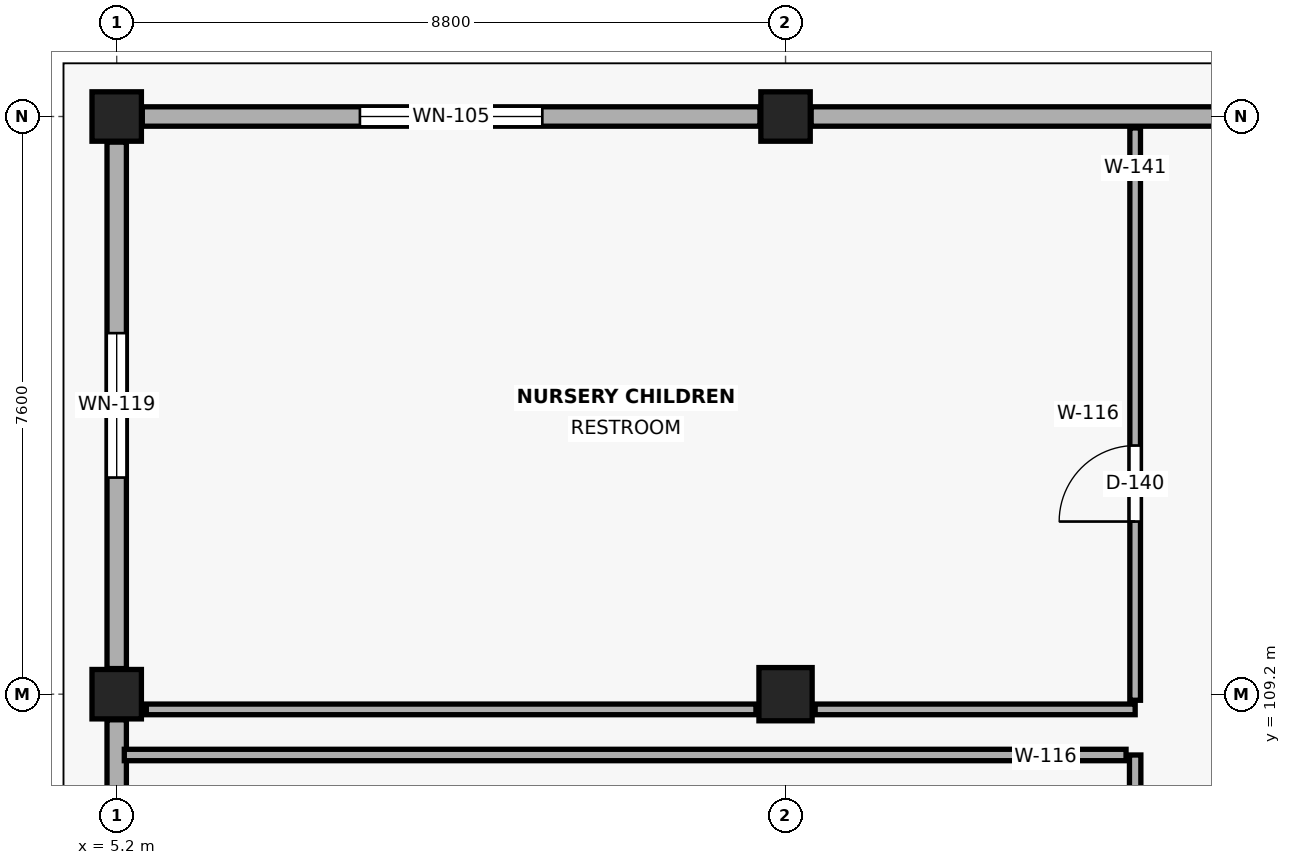
"""IFC4 building model, lengths in metres.
Left out: names, types, materials, properties, quantities, classifications, styles, units other than length and angle.
Written with IfcOpenShell. Run it as: python <this file> out.ifc"""

import sys

from ifc_helpers import new_model, si_unit, direction, frame, frame_2d, origin, origin_2d, place, context, subcontext, project, spatial, rectangle, extrude, element, fill, save


model = new_model("IFC4")
c1 = context("Model", 3, precision=1e-05, world=origin(), true_north=direction((0.0, 1.0)))
c2 = subcontext(c1, "Body", "Model", "MODEL_VIEW")
j1 = project(units=[si_unit("LENGTHUNIT", "METRE"), si_unit("PLANEANGLEUNIT", "RADIAN")], contexts=[c1])
p1 = place(None, origin())
s1 = spatial("IfcSite", under=j1, at=p1, CompositionType="ELEMENT")
p2 = place(p1, origin())
s2 = spatial("IfcBuilding", under=s1, at=p2, CompositionType="ELEMENT")
p3 = place(p2, origin())
s3 = spatial("IfcBuildingStorey", under=s2, at=p3, CompositionType="ELEMENT", Elevation=0.0)
for number, where, z_axis, x_axis in (
    (1, (5.2, 109.2, 0.0), (0.0, 0.0, 1.0), (1.0, 0.0, 0.0)),
    (2, (5.2, 116.8, 0.0), (0.0, 0.0, 1.0), (1.0, 0.0, 0.0)),
):
    element("IfcColumn", number, at=place(p3, frame(where, z_axis=z_axis, x_axis=x_axis)), inside=s3, PredefinedType="COLUMN", context=c2, shape_type="SweptSolid", body=[
        extrude(rectangle(XDim=0.65, YDim=0.65, at=origin_2d()), origin(), (0.0, 0.0, 1.0), 5.1),
    ])
p4 = place(p3, frame((14.0, 109.2, 0.0), z_axis=(0.0, 0.0, 1.0), x_axis=(1.0, 0.0, 0.0)))
e3 = element("IfcColumn", 3, at=p4, inside=s3, PredefinedType="COLUMN", context=c2, shape_type="SweptSolid", body=[
    extrude(rectangle(XDim=0.7, YDim=0.7, at=origin_2d()), origin(), (0.0, 0.0, 1.0), 5.1),
])
p5 = place(p3, frame((14.0, 116.8, 0.0), z_axis=(0.0, 0.0, 1.0), x_axis=(1.0, 0.0, 0.0)))
e4 = element("IfcColumn", 4, at=p5, inside=s3, PredefinedType="COLUMN", context=c2, shape_type="SweptSolid", body=[
    extrude(rectangle(XDim=0.65, YDim=0.65, at=origin_2d()), origin(), (0.0, 0.0, 1.0), 5.1),
])
p6 = place(p3, frame((5.537, 116.8, 0.0), z_axis=(0.0, 0.0, 1.0), x_axis=(1.0, 0.0, 0.0)))
e5 = element("IfcWall", 5, at=p6, inside=s3, PredefinedType="SOLIDWALL", context=c2, shape_type="SweptSolid", body=[
    extrude(rectangle(XDim=8.126, YDim=0.255, at=frame_2d((4.063, 0.0))), origin(), (0.0, 0.0, 1.0), 3.94),
])
p7 = place(p6, frame((2.863, 0.0, 0.85)))
e6 = element("IfcOpeningElement", 6, at=p7, cuts=e5, PredefinedType="OPENING", context=c2, shape_type="SweptSolid", body=[
    extrude(rectangle(XDim=2.4, YDim=2.4, at=frame_2d((1.2, 1.2))), frame((0.0, 0.139, 0.0), z_axis=(0.0, -1.0, 0.0), x_axis=(1.0, 0.0, 0.0)), (0.0, 0.0, 1.0), 0.279),
])
p8 = place(p3, frame((14.337, 116.8, 0.0), z_axis=(0.0, 0.0, 1.0), x_axis=(1.0, 0.0, 0.0)))
e7 = element("IfcWall", 7, at=p8, inside=s3, PredefinedType="SOLIDWALL", context=c2, shape_type="SweptSolid", body=[
    extrude(rectangle(XDim=8.526, YDim=0.255, at=frame_2d((4.263, 0.0))), origin(), (0.0, 0.0, 1.0), 3.94),
])
p9 = place(p3, frame((5.2, 101.537, 0.0), z_axis=(0.0, 0.0, 1.0), x_axis=(0.0, 1.0, 0.0)))
e8 = element("IfcWall", 8, at=p9, inside=s3, PredefinedType="SOLIDWALL", context=c2, shape_type="SweptSolid", body=[
    extrude(rectangle(XDim=7.326, YDim=0.255, at=frame_2d((3.663, 0.0))), origin(), (0.0, 0.0, 1.0), 3.94),
])
p10 = place(p9, frame((2.713, 0.0, 0.9)))
e9 = element("IfcOpeningElement", 9, at=p10, cuts=e8, PredefinedType="OPENING", context=c2, shape_type="SweptSolid", body=[
    extrude(rectangle(XDim=1.9, YDim=1.6, at=frame_2d((0.95, 0.8))), frame((0.0, 0.139, 0.0), z_axis=(0.0, -1.0, 0.0), x_axis=(1.0, 0.0, 0.0)), (0.0, 0.0, 1.0), 0.279),
])
p11 = place(p3, frame((5.2, 109.537, 0.0), z_axis=(0.0, 0.0, 1.0), x_axis=(0.0, 1.0, 0.0)))
e10 = element("IfcWall", 10, at=p11, inside=s3, PredefinedType="SOLIDWALL", context=c2, shape_type="SweptSolid", body=[
    extrude(rectangle(XDim=6.926, YDim=0.255, at=frame_2d((3.463, 0.0))), origin(), (0.0, 0.0, 1.0), 3.94),
])
p12 = place(p11, frame((2.513, 0.0, 0.9)))
e11 = element("IfcOpeningElement", 11, at=p12, cuts=e10, PredefinedType="OPENING", context=c2, shape_type="SweptSolid", body=[
    extrude(rectangle(XDim=1.9, YDim=1.6, at=frame_2d((0.95, 0.8))), frame((0.0, 0.139, 0.0), z_axis=(0.0, -1.0, 0.0), x_axis=(1.0, 0.0, 0.0)), (0.0, 0.0, 1.0), 0.279),
])
p13 = place(p3, frame((18.6, 75.52, 0.0), z_axis=(0.0, 0.0, 1.0), x_axis=(0.0, 1.0, 0.0)))
e12 = element("IfcWall", 12, at=p13, inside=s3, PredefinedType="PARTITIONING", context=c2, shape_type="SweptSolid", body=[
    extrude(rectangle(XDim=32.88, YDim=0.15, at=frame_2d((16.44, 0.0))), origin(), (0.0, 0.0, 1.0), 4.8),
])
p14 = place(p13, frame((11.182, 0.0, 0.0)))
e13 = element("IfcOpeningElement", 13, at=p14, cuts=e12, PredefinedType="OPENING", context=c2, shape_type="SweptSolid", body=[
    extrude(rectangle(XDim=1.4, YDim=2.3, at=frame_2d((0.7, 1.15))), frame((0.0, 0.087, 0.0), z_axis=(0.0, -1.0, 0.0), x_axis=(1.0, 0.0, 0.0)), (0.0, 0.0, 1.0), 0.174),
])
p15 = place(p3, frame((18.48, 108.4, 0.0), z_axis=(0.0, 0.0, 1.0), x_axis=(-1.0, 0.0, 0.0)))
e14 = element("IfcWall", 14, at=p15, inside=s3, PredefinedType="PARTITIONING", context=c2, shape_type="SweptSolid", body=[
    extrude(rectangle(XDim=13.18, YDim=0.15, at=frame_2d((6.59, 0.0))), origin(), (0.0, 0.0, 1.0), 4.8),
])
p16 = place(p3, frame((5.59, 109.0, 0.0), z_axis=(0.0, 0.0, 1.0), x_axis=(1.0, 0.0, 0.0)))
e15 = element("IfcWall", 15, at=p16, inside=s3, PredefinedType="PLUMBINGWALL", context=c2, shape_type="SweptSolid", body=[
    extrude(rectangle(XDim=8.021, YDim=0.14, at=frame_2d((4.01, 0.0))), origin(), (0.0, 0.0, 1.0), 4.8),
])
p17 = place(p3, frame((14.39, 109.0, 0.0), z_axis=(0.0, 0.0, 1.0), x_axis=(1.0, 0.0, 0.0)))
e16 = element("IfcWall", 16, at=p17, inside=s3, PredefinedType="PLUMBINGWALL", context=c2, shape_type="SweptSolid", body=[
    extrude(rectangle(XDim=4.21, YDim=0.14, at=frame_2d((2.105, 0.0))), origin(), (0.0, 0.0, 1.0), 4.8),
])
p18 = place(p3, frame((18.6, 109.12, 0.0), z_axis=(0.0, 0.0, 1.0), x_axis=(0.0, 1.0, 0.0)))
e17 = element("IfcWall", 17, at=p18, inside=s3, PredefinedType="PLUMBINGWALL", context=c2, shape_type="SweptSolid", body=[
    extrude(rectangle(XDim=7.53, YDim=0.14, at=frame_2d((3.765, 0.0))), origin(), (0.0, 0.0, 1.0), 4.8),
])
p19 = place(p18, frame((2.351, 0.0, 0.0)))
e18 = element("IfcOpeningElement", 18, at=p19, cuts=e17, PredefinedType="OPENING", context=c2, shape_type="SweptSolid", body=[
    extrude(rectangle(XDim=1.0, YDim=2.15, at=frame_2d((0.5, 1.075))), frame((0.0, 0.082, 0.0), z_axis=(0.0, -1.0, 0.0), x_axis=(1.0, 0.0, 0.0)), (0.0, 0.0, 1.0), 0.164),
])
p20 = place(p7, origin())
e19 = element("IfcWindow", 19, at=p20, inside=s3, PartitioningType="SINGLE_PANEL", PredefinedType="WINDOW", context=c2, shape_type="SweptSolid", body=[
    extrude(rectangle(XDim=2.4, YDim=2.4, at=frame_2d((1.2, 1.2))), frame((0.0, 0.03, 0.0), z_axis=(0.0, -1.0, 0.0), x_axis=(1.0, 0.0, 0.0)), (0.0, 0.0, 1.0), 0.06),
])
fill(e6, e19)
p21 = place(p12, origin())
e20 = element("IfcWindow", 20, at=p21, inside=s3, PartitioningType="SINGLE_PANEL", PredefinedType="WINDOW", context=c2, shape_type="SweptSolid", body=[
    extrude(rectangle(XDim=1.9, YDim=1.6, at=frame_2d((0.95, 0.8))), frame((0.0, 0.03, 0.0), z_axis=(0.0, -1.0, 0.0), x_axis=(1.0, 0.0, 0.0)), (0.0, 0.0, 1.0), 0.06),
])
fill(e11, e20)
p22 = place(p19, origin())
e21 = element("IfcDoor", 21, at=p22, inside=s3, OperationType="SINGLE_SWING_LEFT", PredefinedType="DOOR", context=c2, shape_type="SweptSolid", body=[
    extrude(rectangle(XDim=1.0, YDim=2.15, at=frame_2d((0.5, 1.075))), frame((0.0, 0.025, 0.0), z_axis=(0.0, -1.0, 0.0), x_axis=(1.0, 0.0, 0.0)), (0.0, 0.0, 1.0), 0.05),
])
fill(e18, e21)
save(model, sys.argv[1])
